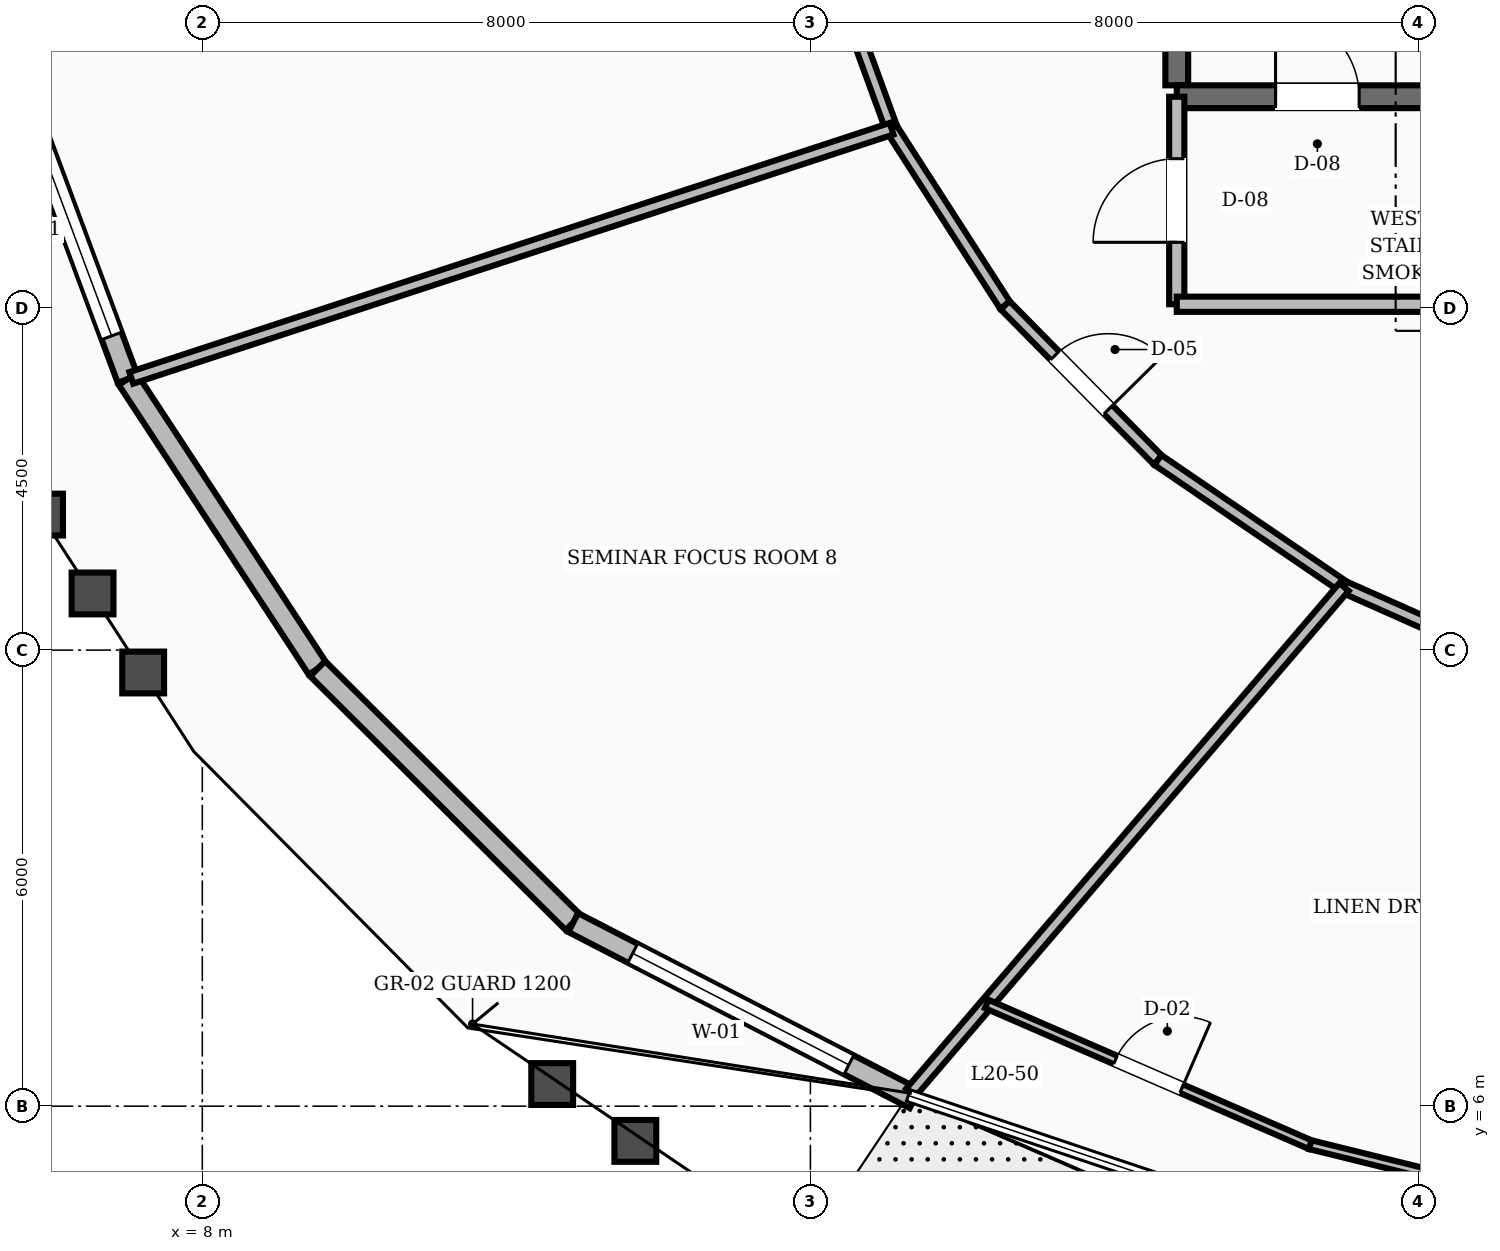
"""IFC4 building model, lengths in metres.
Left out: names, types, materials, properties, quantities, classifications, styles, units other than length and angle.
Written with IfcOpenShell. Run it as: python <this file> out.ifc"""

import sys

from ifc_helpers import new_model, si_unit, direction, frame, frame_2d, origin, place, context, subcontext, project, spatial, rectangle, extrude, element, fill, save


model = new_model("IFC4")
c1 = context("Model", 3, precision=1e-05, world=origin(), true_north=direction((0.0, 1.0)))
c2 = subcontext(c1, "Body", "Model", "MODEL_VIEW")
j1 = project(units=[si_unit("LENGTHUNIT", "METRE"), si_unit("PLANEANGLEUNIT", "RADIAN")], contexts=[c1])
p1 = place(None, origin())
s1 = spatial("IfcSite", under=j1, at=p1, CompositionType="ELEMENT")
p2 = place(p1, origin())
s2 = spatial("IfcBuilding", under=s1, at=p2, CompositionType="ELEMENT")
p3 = place(p2, frame((0.0, 0.0, 80.8)))
s3 = spatial("IfcBuildingStorey", under=s2, at=p3, CompositionType="ELEMENT", Elevation=80.8)
p4 = place(p3, frame((20.82, 19.43, 0.0), z_axis=(0.0, 0.0, 1.0), x_axis=(0.0, 1.0, 0.0)))
e1 = element("IfcWall", 1, at=p4, inside=s3, PredefinedType="SHEAR", context=c2, shape_type="SweptSolid", body=[
    extrude(rectangle(XDim=8.74, YDim=0.3, at=frame_2d((4.37, 0.0))), origin(), (0.0, 0.0, 1.0), 3.6),
])
p5 = place(p3, frame((20.82, 19.28, 0.0), z_axis=(0.0, 0.0, 1.0), x_axis=(1.0, 0.0, 0.0)))
e2 = element("IfcWall", 2, at=p5, inside=s3, PredefinedType="SHEAR", context=c2, shape_type="SweptSolid", body=[
    extrude(rectangle(XDim=3.6, YDim=0.3, at=frame_2d((1.8, 0.0))), origin(), (0.0, 0.0, 1.0), 3.6),
])
p6 = place(p5, frame((1.3, 0.0, 0.0)))
e3 = element("IfcOpeningElement", 3, at=p6, cuts=e2, PredefinedType="OPENING", context=c2, shape_type="SweptSolid", body=[
    extrude(rectangle(XDim=1.1, YDim=2.1, at=frame_2d((0.55, 1.05))), frame((0.0, 0.16, 0.0), z_axis=(0.0, -1.0, 0.0), x_axis=(1.0, 0.0, 0.0)), (0.0, 0.0, 1.0), 0.32),
])
p7 = place(p3, frame((5.479, 19.7, 0.0), z_axis=(0.0, 0.0, 1.0), x_axis=(0.348811713435, -0.93719282358, 0.0)))
e4 = element("IfcWall", 4, at=p7, inside=s3, PredefinedType="STANDARD", context=c2, shape_type="SweptSolid", body=[
    extrude(rectangle(XDim=4.412, YDim=0.28, at=frame_2d((2.206, 0.0))), origin(), (0.0, 0.0, 1.0), 2.71),
])
p8 = place(p7, frame((0.606, 0.0, 0.8)))
e5 = element("IfcOpeningElement", 5, at=p8, cuts=e4, PredefinedType="OPENING", context=c2, shape_type="SweptSolid", body=[
    extrude(rectangle(XDim=3.2, YDim=1.65, at=frame_2d((1.6, 0.825))), frame((0.0, 0.15, 0.0), z_axis=(0.0, -1.0, 0.0), x_axis=(1.0, 0.0, 0.0)), (0.0, 0.0, 1.0), 0.3),
])
p9 = place(p3, frame((7.018, 15.566, 0.0), z_axis=(0.0, 0.0, 1.0), x_axis=(0.54836617539, -0.83623832589, 0.0)))
e6 = element("IfcWall", 6, at=p9, inside=s3, PredefinedType="STANDARD", context=c2, shape_type="SweptSolid", body=[
    extrude(rectangle(XDim=4.557, YDim=0.28, at=frame_2d((2.278, 0.0))), origin(), (0.0, 0.0, 1.0), 2.71),
])
p10 = place(p3, frame((9.517, 11.755, 0.0), z_axis=(0.0, 0.0, 1.0), x_axis=(0.709523691603, -0.704681581322, 0.0)))
e7 = element("IfcWall", 7, at=p10, inside=s3, PredefinedType="STANDARD", context=c2, shape_type="SweptSolid", body=[
    extrude(rectangle(XDim=4.74, YDim=0.28, at=frame_2d((2.37, 0.0))), origin(), (0.0, 0.0, 1.0), 2.71),
])
p11 = place(p3, frame((12.88, 8.415, 0.0), z_axis=(0.0, 0.0, 1.0), x_axis=(0.88864352283, -0.45859861462, 0.0)))
e8 = element("IfcWall", 8, at=p11, inside=s3, PredefinedType="STANDARD", context=c2, shape_type="SweptSolid", body=[
    extrude(rectangle(XDim=5.053, YDim=0.28, at=frame_2d((2.527, 0.0))), origin(), (0.0, 0.0, 1.0), 2.71),
])
p12 = place(p11, frame((0.881, 0.0, 0.8)))
e9 = element("IfcOpeningElement", 9, at=p12, cuts=e8, PredefinedType="OPENING", context=c2, shape_type="SweptSolid", body=[
    extrude(rectangle(XDim=3.2, YDim=1.65, at=frame_2d((1.6, 0.825))), frame((0.0, 0.15, 0.0), z_axis=(0.0, -1.0, 0.0), x_axis=(1.0, 0.0, 0.0)), (0.0, 0.0, 1.0), 0.3),
])
p13 = place(p3, frame((20.82, 16.55, 0.0), z_axis=(0.0, 0.0, 1.0), x_axis=(0.0, 1.0, 0.0)))
e10 = element("IfcWall", 10, at=p13, inside=s3, PredefinedType="SOLIDWALL", context=c2, shape_type="SweptSolid", body=[
    extrude(rectangle(XDim=2.73, YDim=0.2, at=frame_2d((1.365, 0.0))), origin(), (0.0, 0.0, 1.0), 2.71),
])
p14 = place(p13, frame((0.815, 0.0, 0.0)))
e11 = element("IfcOpeningElement", 11, at=p14, cuts=e10, PredefinedType="OPENING", context=c2, shape_type="SweptSolid", body=[
    extrude(rectangle(XDim=1.1, YDim=2.1, at=frame_2d((0.55, 1.05))), frame((0.0, 0.11, 0.0), z_axis=(0.0, -1.0, 0.0), x_axis=(1.0, 0.0, 0.0)), (0.0, 0.0, 1.0), 0.22),
])
p15 = place(p3, frame((20.82, 16.55, 0.0), z_axis=(0.0, 0.0, 1.0), x_axis=(1.0, 0.0, 0.0)))
e12 = element("IfcWall", 12, at=p15, inside=s3, PredefinedType="SOLIDWALL", context=c2, shape_type="SweptSolid", body=[
    extrude(rectangle(XDim=3.98, YDim=0.2, at=frame_2d((1.99, 0.0))), origin(), (0.0, 0.0, 1.0), 2.71),
])
p16 = place(p3, frame((16.148, 21.379, 0.0), z_axis=(0.0, 0.0, 1.0), x_axis=(0.342882618672, -0.939378257047, 0.0)))
e13 = element("IfcWall", 13, at=p16, inside=s3, PredefinedType="SOLIDWALL", context=c2, shape_type="SweptSolid", body=[
    extrude(rectangle(XDim=2.683, YDim=0.16, at=frame_2d((1.341, 0.0))), origin(), (0.0, 0.0, 1.0), 2.71),
])
p17 = place(p3, frame((17.068, 18.859, 0.0), z_axis=(0.0, 0.0, 1.0), x_axis=(0.540891657444, -0.841092274907, 0.0)))
e14 = element("IfcWall", 14, at=p17, inside=s3, PredefinedType="SOLIDWALL", context=c2, shape_type="SweptSolid", body=[
    extrude(rectangle(XDim=2.761, YDim=0.16, at=frame_2d((1.38, 0.0))), origin(), (0.0, 0.0, 1.0), 2.71),
])
p18 = place(p3, frame((18.562, 16.537, 0.0), z_axis=(0.0, 0.0, 1.0), x_axis=(0.702569520063, -0.711615113301, 0.0)))
e15 = element("IfcWall", 15, at=p18, inside=s3, PredefinedType="SOLIDWALL", context=c2, shape_type="SweptSolid", body=[
    extrude(rectangle(XDim=2.861, YDim=0.16, at=frame_2d((1.43, 0.0))), origin(), (0.0, 0.0, 1.0), 2.71),
])
p19 = place(p18, frame((0.93, 0.0, 0.0)))
e16 = element("IfcOpeningElement", 16, at=p19, cuts=e15, PredefinedType="OPENING", context=c2, shape_type="SweptSolid", body=[
    extrude(rectangle(XDim=1.0, YDim=2.1, at=frame_2d((0.5, 1.05))), frame((0.0, 0.09, 0.0), z_axis=(0.0, -1.0, 0.0), x_axis=(1.0, 0.0, 0.0)), (0.0, 0.0, 1.0), 0.18),
])
p20 = place(p3, frame((20.572, 14.501, 0.0), z_axis=(0.0, 0.0, 1.0), x_axis=(0.826112340767, -0.563505457323, 0.0)))
e17 = element("IfcWall", 17, at=p20, inside=s3, PredefinedType="SOLIDWALL", context=c2, shape_type="SweptSolid", body=[
    extrude(rectangle(XDim=2.965, YDim=0.16, at=frame_2d((1.482, 0.0))), origin(), (0.0, 0.0, 1.0), 2.71),
])
p21 = place(p3, frame((23.021, 12.83, 0.0), z_axis=(0.0, 0.0, 1.0), x_axis=(0.913860932409, -0.406027334321, 0.0)))
e18 = element("IfcWall", 18, at=p21, inside=s3, PredefinedType="SOLIDWALL", context=c2, shape_type="SweptSolid", body=[
    extrude(rectangle(XDim=3.058, YDim=0.16, at=frame_2d((1.529, 0.0))), origin(), (0.0, 0.0, 1.0), 2.71),
])
p22 = place(p3, frame((17.068, 18.859, 0.0), z_axis=(0.0, 0.0, 1.0), x_axis=(-0.950282996708, -0.311387581909, 0.0)))
e19 = element("IfcWall", 19, at=p22, inside=s3, PredefinedType="SOLIDWALL", context=c2, shape_type="SweptSolid", body=[
    extrude(rectangle(XDim=10.526, YDim=0.16, at=frame_2d((5.263, 0.0))), origin(), (0.0, 0.0, 1.0), 2.71),
])
p23 = place(p3, frame((23.021, 12.83, 0.0), z_axis=(0.0, 0.0, 1.0), x_axis=(-0.650669722838, -0.75936085742, 0.0)))
e20 = element("IfcWall", 20, at=p23, inside=s3, PredefinedType="SOLIDWALL", context=c2, shape_type="SweptSolid", body=[
    extrude(rectangle(XDim=8.76, YDim=0.16, at=frame_2d((4.38, 0.0))), origin(), (0.0, 0.0, 1.0), 2.71),
])
p24 = place(p3, frame((18.32, 7.344, 0.0), z_axis=(0.0, 0.0, 1.0), x_axis=(0.917048314464, -0.398776113803, 0.0)))
e21 = element("IfcWall", 21, at=p24, inside=s3, PredefinedType="PARTITIONING", context=c2, shape_type="SweptSolid", body=[
    extrude(rectangle(XDim=4.642, YDim=0.12, at=frame_2d((2.321, 0.0))), origin(), (0.0, 0.0, 1.0), 2.71),
])
p25 = place(p24, frame((1.846, 0.0, 0.0)))
e22 = element("IfcOpeningElement", 22, at=p25, cuts=e21, PredefinedType="OPENING", context=c2, shape_type="SweptSolid", body=[
    extrude(rectangle(XDim=0.95, YDim=2.1, at=frame_2d((0.475, 1.05))), frame((0.0, 0.07, 0.0), z_axis=(0.0, -1.0, 0.0), x_axis=(1.0, 0.0, 0.0)), (0.0, 0.0, 1.0), 0.14),
])
p26 = place(p3, frame((22.577, 5.493, 0.0), z_axis=(0.0, 0.0, 1.0), x_axis=(0.970874544105, -0.239588437972, 0.0)))
e23 = element("IfcWall", 23, at=p26, inside=s3, PredefinedType="PARTITIONING", context=c2, shape_type="SweptSolid", body=[
    extrude(rectangle(XDim=4.758, YDim=0.12, at=frame_2d((2.379, 0.0))), origin(), (0.0, 0.0, 1.0), 2.71),
])
p27 = place(p8, origin())
e24 = element("IfcWindow", 24, at=p27, inside=s3, PartitioningType="SINGLE_PANEL", PredefinedType="WINDOW", context=c2, shape_type="SweptSolid", body=[
    extrude(rectangle(XDim=3.2, YDim=1.65, at=frame_2d((1.6, 0.825))), frame((0.0, 0.03, 0.0), z_axis=(0.0, -1.0, 0.0), x_axis=(1.0, 0.0, 0.0)), (0.0, 0.0, 1.0), 0.06),
])
fill(e5, e24)
p28 = place(p12, origin())
e25 = element("IfcWindow", 25, at=p28, inside=s3, PartitioningType="SINGLE_PANEL", PredefinedType="WINDOW", context=c2, shape_type="SweptSolid", body=[
    extrude(rectangle(XDim=3.2, YDim=1.65, at=frame_2d((1.6, 0.825))), frame((0.0, 0.03, 0.0), z_axis=(0.0, -1.0, 0.0), x_axis=(1.0, 0.0, 0.0)), (0.0, 0.0, 1.0), 0.06),
])
fill(e9, e25)
p29 = place(p6, origin())
e26 = element("IfcDoor", 26, at=p29, inside=s3, OperationType="SINGLE_SWING_LEFT", PredefinedType="DOOR", context=c2, shape_type="SweptSolid", body=[
    extrude(rectangle(XDim=1.1, YDim=2.1, at=frame_2d((0.55, 1.05))), frame((0.0, 0.025, 0.0), z_axis=(0.0, -1.0, 0.0), x_axis=(1.0, 0.0, 0.0)), (0.0, 0.0, 1.0), 0.05),
])
fill(e3, e26)
p30 = place(p14, origin())
e27 = element("IfcDoor", 27, at=p30, inside=s3, OperationType="SINGLE_SWING_LEFT", PredefinedType="DOOR", context=c2, shape_type="SweptSolid", body=[
    extrude(rectangle(XDim=1.1, YDim=2.1, at=frame_2d((0.55, 1.05))), frame((0.0, 0.025, 0.0), z_axis=(0.0, -1.0, 0.0), x_axis=(1.0, 0.0, 0.0)), (0.0, 0.0, 1.0), 0.05),
])
fill(e11, e27)
p31 = place(p19, origin())
e28 = element("IfcDoor", 28, at=p31, inside=s3, OperationType="SINGLE_SWING_RIGHT", PredefinedType="DOOR", context=c2, shape_type="SweptSolid", body=[
    extrude(rectangle(XDim=1.0, YDim=2.1, at=frame_2d((0.5, 1.05))), frame((0.0, 0.025, 0.0), z_axis=(0.0, -1.0, 0.0), x_axis=(1.0, 0.0, 0.0)), (0.0, 0.0, 1.0), 0.05),
])
fill(e16, e28)
p32 = place(p25, origin())
e29 = element("IfcDoor", 29, at=p32, inside=s3, OperationType="SINGLE_SWING_RIGHT", PredefinedType="DOOR", context=c2, shape_type="SweptSolid", body=[
    extrude(rectangle(XDim=0.95, YDim=2.1, at=frame_2d((0.475, 1.05))), frame((0.0, 0.025, 0.0), z_axis=(0.0, -1.0, 0.0), x_axis=(1.0, 0.0, 0.0)), (0.0, 0.0, 1.0), 0.05),
])
fill(e22, e29)
save(model, sys.argv[1])
